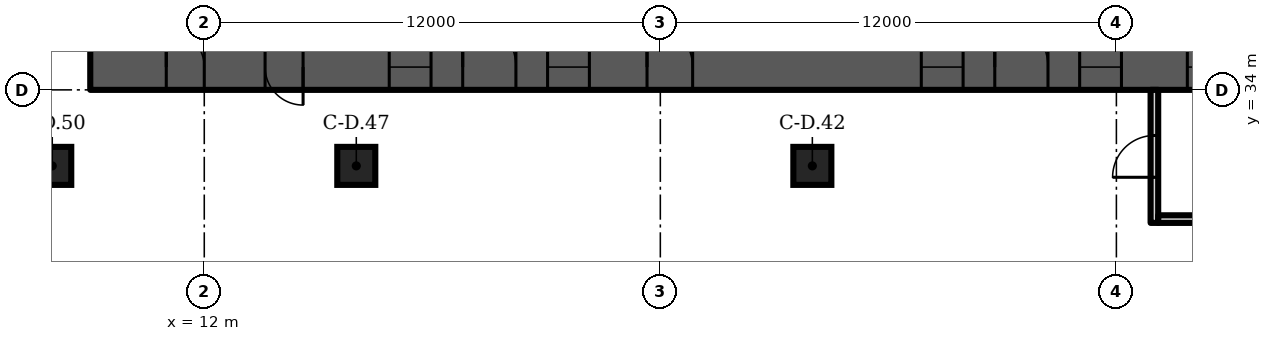
"""IFC4 building model, lengths in metres.
Left out: names, types, materials, properties, quantities, classifications, styles, units other than length and angle.
Written with IfcOpenShell. Run it as: python <this file> out.ifc"""

import sys

from ifc_helpers import new_model, si_unit, direction, frame, frame_2d, origin, origin_2d, place, context, subcontext, project, spatial, rectangle, extrude, element, fill, save


model = new_model("IFC4")
c1 = context("Model", 3, precision=1e-05, world=origin(), true_north=direction((0.0, 1.0)))
c2 = subcontext(c1, "Body", "Model", "MODEL_VIEW")
j1 = project(units=[si_unit("LENGTHUNIT", "METRE"), si_unit("PLANEANGLEUNIT", "RADIAN")], contexts=[c1])
p1 = place(None, origin())
s1 = spatial("IfcSite", under=j1, at=p1, CompositionType="ELEMENT")
p2 = place(p1, origin())
s2 = spatial("IfcBuilding", under=s1, at=p2, CompositionType="ELEMENT")
p3 = place(p2, frame((0.0, 0.0, 8.0)))
s3 = spatial("IfcBuildingStorey", under=s2, at=p3, CompositionType="ELEMENT", Elevation=8.0)
for number, where, z_axis, x_axis in (
    (1, (28.0, 32.0, 0.0), (0.0, 0.0, 1.0), (1.0, 0.0, 0.0)),
    (2, (16.0, 32.0, 0.0), (0.0, 0.0, 1.0), (1.0, 0.0, 0.0)),
    (3, (8.0, 32.0, 0.0), (0.0, 0.0, 1.0), (1.0, 0.0, 0.0)),
):
    element("IfcColumn", number, at=place(p3, frame(where, z_axis=z_axis, x_axis=x_axis)), inside=s3, PredefinedType="COLUMN", context=c2, shape_type="SweptSolid", body=[
        extrude(rectangle(XDim=1.0, YDim=1.0, at=origin_2d()), origin(), (0.0, 0.0, 1.0), 7.0),
    ])
p4 = place(p3, frame((9.0, 34.6, 0.0), z_axis=(0.0, 0.0, 1.0), x_axis=(1.0, 0.0, 0.0)))
e4 = element("IfcWall", 4, at=p4, inside=s3, PredefinedType="SHEAR", context=c2, shape_type="SweptSolid", body=[
    extrude(rectangle(XDim=56.0, YDim=1.2, at=frame_2d((28.0, 0.0))), origin(), (0.0, 0.0, 1.0), 6.7),
])
p5 = place(p4, frame((2.0, 0.0, 0.0)))
e5 = element("IfcOpeningElement", 5, at=p5, cuts=e4, PredefinedType="OPENING", context=c2, shape_type="SweptSolid", body=[
    extrude(rectangle(XDim=1.0, YDim=2.1, at=frame_2d((0.5, 1.05))), frame((0.0, 0.61, 0.0), z_axis=(0.0, -1.0, 0.0), x_axis=(1.0, 0.0, 0.0)), (0.0, 0.0, 1.0), 1.22),
])
p6 = place(p4, frame((4.6, 0.0, 0.0)))
e6 = element("IfcOpeningElement", 6, at=p6, cuts=e4, PredefinedType="OPENING", context=c2, shape_type="SweptSolid", body=[
    extrude(rectangle(XDim=1.0, YDim=2.1, at=frame_2d((0.5, 1.05))), frame((0.0, 0.61, 0.0), z_axis=(0.0, -1.0, 0.0), x_axis=(1.0, 0.0, 0.0)), (0.0, 0.0, 1.0), 1.22),
])
p7 = place(p4, frame((7.867, 0.0, 0.0)))
e7 = element("IfcOpeningElement", 7, at=p7, cuts=e4, PredefinedType="OPENING", context=c2, shape_type="SweptSolid", body=[
    extrude(rectangle(XDim=1.1, YDim=2.1, at=frame_2d((0.55, 1.05))), frame((0.0, 0.61, 0.0), z_axis=(0.0, -1.0, 0.0), x_axis=(1.0, 0.0, 0.0)), (0.0, 0.0, 1.0), 1.22),
])
p8 = place(p4, frame((12.033, 0.0, 0.0)))
e8 = element("IfcOpeningElement", 8, at=p8, cuts=e4, PredefinedType="OPENING", context=c2, shape_type="SweptSolid", body=[
    extrude(rectangle(XDim=1.1, YDim=2.1, at=frame_2d((0.55, 1.05))), frame((0.0, 0.61, 0.0), z_axis=(0.0, -1.0, 0.0), x_axis=(1.0, 0.0, 0.0)), (0.0, 0.0, 1.0), 1.22),
])
p9 = place(p4, frame((9.8, 0.0, 0.0)))
e9 = element("IfcOpeningElement", 9, at=p9, cuts=e4, PredefinedType="OPENING", context=c2, shape_type="SweptSolid", body=[
    extrude(rectangle(XDim=1.4, YDim=2.1, at=frame_2d((0.7, 1.05))), frame((0.0, 0.61, 0.0), z_axis=(0.0, -1.0, 0.0), x_axis=(1.0, 0.0, 0.0)), (0.0, 0.0, 1.0), 1.22),
])
p10 = place(p4, frame((14.65, 0.0, 0.0)))
e10 = element("IfcOpeningElement", 10, at=p10, cuts=e4, PredefinedType="OPENING", context=c2, shape_type="SweptSolid", body=[
    extrude(rectangle(XDim=1.2, YDim=2.1, at=frame_2d((0.6, 1.05))), frame((0.0, 0.61, 0.0), z_axis=(0.0, -1.0, 0.0), x_axis=(1.0, 0.0, 0.0)), (0.0, 0.0, 1.0), 1.22),
])
p11 = place(p4, frame((21.867, 0.0, 0.0)))
e11 = element("IfcOpeningElement", 11, at=p11, cuts=e4, PredefinedType="OPENING", context=c2, shape_type="SweptSolid", body=[
    extrude(rectangle(XDim=1.1, YDim=2.1, at=frame_2d((0.55, 1.05))), frame((0.0, 0.61, 0.0), z_axis=(0.0, -1.0, 0.0), x_axis=(1.0, 0.0, 0.0)), (0.0, 0.0, 1.0), 1.22),
])
p12 = place(p4, frame((26.033, 0.0, 0.0)))
e12 = element("IfcOpeningElement", 12, at=p12, cuts=e4, PredefinedType="OPENING", context=c2, shape_type="SweptSolid", body=[
    extrude(rectangle(XDim=1.1, YDim=2.1, at=frame_2d((0.55, 1.05))), frame((0.0, 0.61, 0.0), z_axis=(0.0, -1.0, 0.0), x_axis=(1.0, 0.0, 0.0)), (0.0, 0.0, 1.0), 1.22),
])
p13 = place(p4, frame((23.8, 0.0, 0.0)))
e13 = element("IfcOpeningElement", 13, at=p13, cuts=e4, PredefinedType="OPENING", context=c2, shape_type="SweptSolid", body=[
    extrude(rectangle(XDim=1.4, YDim=2.1, at=frame_2d((0.7, 1.05))), frame((0.0, 0.61, 0.0), z_axis=(0.0, -1.0, 0.0), x_axis=(1.0, 0.0, 0.0)), (0.0, 0.0, 1.0), 1.22),
])
p14 = place(p4, frame((28.867, 0.0, 0.0)))
e14 = element("IfcOpeningElement", 14, at=p14, cuts=e4, PredefinedType="OPENING", context=c2, shape_type="SweptSolid", body=[
    extrude(rectangle(XDim=1.1, YDim=2.1, at=frame_2d((0.55, 1.05))), frame((0.0, 0.61, 0.0), z_axis=(0.0, -1.0, 0.0), x_axis=(1.0, 0.0, 0.0)), (0.0, 0.0, 1.0), 1.22),
])
p15 = place(p4, frame((33.033, 0.0, 0.0)))
e15 = element("IfcOpeningElement", 15, at=p15, cuts=e4, PredefinedType="OPENING", context=c2, shape_type="SweptSolid", body=[
    extrude(rectangle(XDim=1.1, YDim=2.1, at=frame_2d((0.55, 1.05))), frame((0.0, 0.61, 0.0), z_axis=(0.0, -1.0, 0.0), x_axis=(1.0, 0.0, 0.0)), (0.0, 0.0, 1.0), 1.22),
])
p16 = place(p4, frame((40.15, 0.0, 0.0)))
e16 = element("IfcOpeningElement", 16, at=p16, cuts=e4, PredefinedType="OPENING", context=c2, shape_type="SweptSolid", body=[
    extrude(rectangle(XDim=1.2, YDim=2.1, at=frame_2d((0.6, 1.05))), frame((0.0, 0.61, 0.0), z_axis=(0.0, -1.0, 0.0), x_axis=(1.0, 0.0, 0.0)), (0.0, 0.0, 1.0), 1.22),
])
p17 = place(p4, frame((44.8, 0.0, 0.0)))
e17 = element("IfcOpeningElement", 17, at=p17, cuts=e4, PredefinedType="OPENING", context=c2, shape_type="SweptSolid", body=[
    extrude(rectangle(XDim=1.4, YDim=2.1, at=frame_2d((0.7, 1.05))), frame((0.0, 0.61, 0.0), z_axis=(0.0, -1.0, 0.0), x_axis=(1.0, 0.0, 0.0)), (0.0, 0.0, 1.0), 1.22),
])
p18 = place(p4, frame((49.867, 0.0, 0.0)))
e18 = element("IfcOpeningElement", 18, at=p18, cuts=e4, PredefinedType="OPENING", context=c2, shape_type="SweptSolid", body=[
    extrude(rectangle(XDim=1.1, YDim=2.1, at=frame_2d((0.55, 1.05))), frame((0.0, 0.61, 0.0), z_axis=(0.0, -1.0, 0.0), x_axis=(1.0, 0.0, 0.0)), (0.0, 0.0, 1.0), 1.22),
])
p19 = place(p4, frame((53.5, 0.0, 0.0)))
e19 = element("IfcOpeningElement", 19, at=p19, cuts=e4, PredefinedType="OPENING", context=c2, shape_type="SweptSolid", body=[
    extrude(rectangle(XDim=1.1, YDim=2.1, at=frame_2d((0.55, 1.05))), frame((0.0, 0.61, 0.0), z_axis=(0.0, -1.0, 0.0), x_axis=(1.0, 0.0, 0.0)), (0.0, 0.0, 1.0), 1.22),
])
p20 = place(p4, frame((51.567, 0.0, 0.0)))
e20 = element("IfcOpeningElement", 20, at=p20, cuts=e4, PredefinedType="OPENING", context=c2, shape_type="SweptSolid", body=[
    extrude(rectangle(XDim=1.4, YDim=2.1, at=frame_2d((0.7, 1.05))), frame((0.0, 0.61, 0.0), z_axis=(0.0, -1.0, 0.0), x_axis=(1.0, 0.0, 0.0)), (0.0, 0.0, 1.0), 1.22),
])
p21 = place(p3, frame((37.0, 30.5, 0.0), z_axis=(0.0, 0.0, 1.0), x_axis=(0.0, 1.0, 0.0)))
e21 = element("IfcWall", 21, at=p21, inside=s3, PredefinedType="PARTITIONING", context=c2, shape_type="SweptSolid", body=[
    extrude(rectangle(XDim=3.5, YDim=0.2, at=frame_2d((1.75, 0.0))), origin(), (0.0, 0.0, 1.0), 6.7),
])
p22 = place(p21, frame((1.2, 0.0, 0.0)))
e22 = element("IfcOpeningElement", 22, at=p22, cuts=e21, PredefinedType="OPENING", context=c2, shape_type="SweptSolid", body=[
    extrude(rectangle(XDim=1.1, YDim=2.1, at=frame_2d((0.55, 1.05))), frame((0.0, 0.11, 0.0), z_axis=(0.0, -1.0, 0.0), x_axis=(1.0, 0.0, 0.0)), (0.0, 0.0, 1.0), 0.22),
])
p23 = place(p3, frame((37.1, 30.6, 0.0), z_axis=(0.0, 0.0, 1.0), x_axis=(1.0, 0.0, 0.0)))
e23 = element("IfcWall", 23, at=p23, inside=s3, PredefinedType="PARTITIONING", context=c2, shape_type="SweptSolid", body=[
    extrude(rectangle(XDim=2.8, YDim=0.2, at=frame_2d((1.4, 0.0))), origin(), (0.0, 0.0, 1.0), 6.7),
])
p24 = place(p5, origin())
e24 = element("IfcDoor", 24, at=p24, inside=s3, OperationType="SINGLE_SWING_LEFT", PredefinedType="DOOR", context=c2, shape_type="SweptSolid", body=[
    extrude(rectangle(XDim=1.0, YDim=2.1, at=frame_2d((0.5, 1.05))), frame((0.0, 0.6, 0.0), z_axis=(0.0, -1.0, 0.0), x_axis=(1.0, 0.0, 0.0)), (0.0, 0.0, 1.0), 1.199),
])
fill(e5, e24)
p25 = place(p6, origin())
e25 = element("IfcDoor", 25, at=p25, inside=s3, OperationType="SINGLE_SWING_RIGHT", PredefinedType="DOOR", context=c2, shape_type="SweptSolid", body=[
    extrude(rectangle(XDim=1.0, YDim=2.1, at=frame_2d((0.5, 1.05))), frame((0.0, 0.6, 0.0), z_axis=(0.0, -1.0, 0.0), x_axis=(1.0, 0.0, 0.0)), (0.0, 0.0, 1.0), 1.199),
])
fill(e6, e25)
p26 = place(p7, origin())
e26 = element("IfcDoor", 26, at=p26, inside=s3, OperationType="DOUBLE_DOOR_SLIDING", PredefinedType="DOOR", context=c2, shape_type="SweptSolid", body=[
    extrude(rectangle(XDim=1.1, YDim=2.1, at=frame_2d((0.55, 1.05))), frame((0.0, 0.025, 0.0), z_axis=(0.0, -1.0, 0.0), x_axis=(1.0, 0.0, 0.0)), (0.0, 0.0, 1.0), 0.05),
])
fill(e7, e26)
p27 = place(p8, origin())
e27 = element("IfcDoor", 27, at=p27, inside=s3, OperationType="DOUBLE_DOOR_SLIDING", PredefinedType="DOOR", context=c2, shape_type="SweptSolid", body=[
    extrude(rectangle(XDim=1.1, YDim=2.1, at=frame_2d((0.55, 1.05))), frame((0.0, 0.025, 0.0), z_axis=(0.0, -1.0, 0.0), x_axis=(1.0, 0.0, 0.0)), (0.0, 0.0, 1.0), 0.05),
])
fill(e8, e27)
p28 = place(p9, origin())
e28 = element("IfcDoor", 28, at=p28, inside=s3, OperationType="DOUBLE_DOOR_SINGLE_SWING", PredefinedType="DOOR", context=c2, shape_type="SweptSolid", body=[
    extrude(rectangle(XDim=1.4, YDim=2.1, at=frame_2d((0.7, 1.05))), frame((0.0, 0.025, 0.0), z_axis=(0.0, -1.0, 0.0), x_axis=(1.0, 0.0, 0.0)), (0.0, 0.0, 1.0), 0.05),
])
fill(e9, e28)
p29 = place(p10, origin())
e29 = element("IfcDoor", 29, at=p29, inside=s3, OperationType="SINGLE_SWING_LEFT", PredefinedType="DOOR", context=c2, shape_type="SweptSolid", body=[
    extrude(rectangle(XDim=1.2, YDim=2.1, at=frame_2d((0.6, 1.05))), frame((0.0, 0.025, 0.0), z_axis=(0.0, -1.0, 0.0), x_axis=(1.0, 0.0, 0.0)), (0.0, 0.0, 1.0), 0.05),
])
fill(e10, e29)
p30 = place(p11, origin())
e30 = element("IfcDoor", 30, at=p30, inside=s3, OperationType="DOUBLE_DOOR_SLIDING", PredefinedType="DOOR", context=c2, shape_type="SweptSolid", body=[
    extrude(rectangle(XDim=1.1, YDim=2.1, at=frame_2d((0.55, 1.05))), frame((0.0, 0.025, 0.0), z_axis=(0.0, -1.0, 0.0), x_axis=(1.0, 0.0, 0.0)), (0.0, 0.0, 1.0), 0.05),
])
fill(e11, e30)
p31 = place(p12, origin())
e31 = element("IfcDoor", 31, at=p31, inside=s3, OperationType="DOUBLE_DOOR_SLIDING", PredefinedType="DOOR", context=c2, shape_type="SweptSolid", body=[
    extrude(rectangle(XDim=1.1, YDim=2.1, at=frame_2d((0.55, 1.05))), frame((0.0, 0.025, 0.0), z_axis=(0.0, -1.0, 0.0), x_axis=(1.0, 0.0, 0.0)), (0.0, 0.0, 1.0), 0.05),
])
fill(e12, e31)
p32 = place(p13, origin())
e32 = element("IfcDoor", 32, at=p32, inside=s3, OperationType="DOUBLE_DOOR_SINGLE_SWING", PredefinedType="DOOR", context=c2, shape_type="SweptSolid", body=[
    extrude(rectangle(XDim=1.4, YDim=2.1, at=frame_2d((0.7, 1.05))), frame((0.0, 0.025, 0.0), z_axis=(0.0, -1.0, 0.0), x_axis=(1.0, 0.0, 0.0)), (0.0, 0.0, 1.0), 0.05),
])
fill(e13, e32)
p33 = place(p14, origin())
e33 = element("IfcDoor", 33, at=p33, inside=s3, OperationType="DOUBLE_DOOR_SLIDING", PredefinedType="DOOR", context=c2, shape_type="SweptSolid", body=[
    extrude(rectangle(XDim=1.1, YDim=2.1, at=frame_2d((0.55, 1.05))), frame((0.0, 0.025, 0.0), z_axis=(0.0, -1.0, 0.0), x_axis=(1.0, 0.0, 0.0)), (0.0, 0.0, 1.0), 0.05),
])
fill(e14, e33)
p34 = place(p22, origin())
e34 = element("IfcDoor", 34, at=p34, inside=s3, OperationType="SINGLE_SWING_LEFT", PredefinedType="DOOR", context=c2, shape_type="SweptSolid", body=[
    extrude(rectangle(XDim=1.1, YDim=2.1, at=frame_2d((0.55, 1.05))), frame((0.0, 0.025, 0.0), z_axis=(0.0, -1.0, 0.0), x_axis=(1.0, 0.0, 0.0)), (0.0, 0.0, 1.0), 0.05),
])
fill(e22, e34)
save(model, sys.argv[1])
